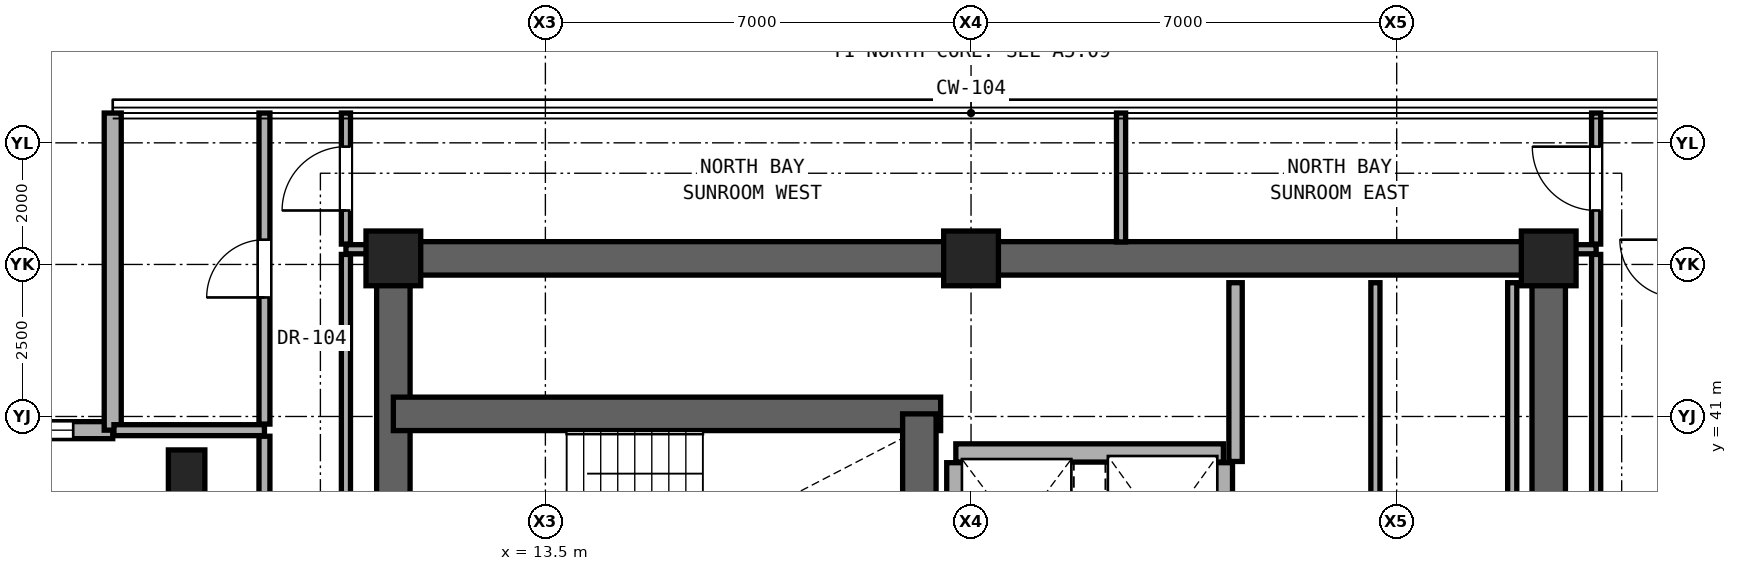
"""IFC4 building model, lengths in metres.
Left out: names, types, materials, properties, quantities, classifications, styles, units other than length and angle.
Written with IfcOpenShell. Run it as: python <this file> out.ifc"""

import sys

from ifc_helpers import new_model, si_unit, direction, frame, frame_2d, origin, origin_2d, place, context, subcontext, project, spatial, rectangle, extrude, element, fill, save


model = new_model("IFC4")
c1 = context("Model", 3, precision=1e-05, world=origin(), true_north=direction((0.0, 1.0)))
c2 = subcontext(c1, "Body", "Model", "MODEL_VIEW")
j1 = project(units=[si_unit("LENGTHUNIT", "METRE"), si_unit("PLANEANGLEUNIT", "RADIAN")], contexts=[c1])
p1 = place(None, origin())
s1 = spatial("IfcSite", under=j1, at=p1, CompositionType="ELEMENT")
p2 = place(p1, origin())
s2 = spatial("IfcBuilding", under=s1, at=p2, CompositionType="ELEMENT")
p3 = place(p2, frame((0.0, 0.0, 183.65)))
s3 = spatial("IfcBuildingStorey", under=s2, at=p3, CompositionType="ELEMENT", Elevation=183.65)
for number, where, z_axis, x_axis in (
    (1, (11.0, 43.6, 0.0), (0.0, 0.0, 1.0), (1.0, 0.0, 0.0)),
    (2, (20.5, 43.6, 0.0), (0.0, 0.0, 1.0), (1.0, 0.0, 0.0)),
    (3, (30.0, 43.6, 0.0), (0.0, 0.0, 1.0), (1.0, 0.0, 0.0)),
):
    element("IfcColumn", number, at=place(p3, frame(where, z_axis=z_axis, x_axis=x_axis)), inside=s3, PredefinedType="COLUMN", context=c2, shape_type="SweptSolid", body=[
        extrude(rectangle(XDim=0.9, YDim=0.9, at=origin_2d()), origin(), (0.0, 0.0, 1.0), 3.25),
    ])
p4 = place(p3, frame((7.6, 40.0, 0.0), z_axis=(0.0, 0.0, 1.0), x_axis=(1.0, 0.0, 0.0)))
e4 = element("IfcColumn", 4, at=p4, inside=s3, PredefinedType="PILASTER", context=c2, shape_type="SweptSolid", body=[
    extrude(rectangle(XDim=0.6, YDim=0.9, at=origin_2d()), origin(), (0.0, 0.0, 1.0), 3.25),
])
p5 = place(p3, frame((11.0, 43.6, 0.0), z_axis=(0.0, 0.0, 1.0), x_axis=(1.0, 0.0, 0.0)))
e5 = element("IfcWall", 5, at=p5, inside=s3, PredefinedType="SHEAR", context=c2, shape_type="SweptSolid", body=[
    extrude(rectangle(XDim=19.0, YDim=0.55, at=frame_2d((9.5, 0.0))), origin(), (0.0, 0.0, 1.0), 3.05),
])
for number, where, z_axis, x_axis in (
    (6, (11.0, 37.6, 0.0), (0.0, 0.0, 1.0), (0.0, 1.0, 0.0)),
    (7, (30.0, 37.6, 0.0), (0.0, 0.0, 1.0), (0.0, 1.0, 0.0)),
):
    element("IfcWall", number, at=place(p3, frame(where, z_axis=z_axis, x_axis=x_axis)), inside=s3, PredefinedType="SHEAR", context=c2, shape_type="SweptSolid", body=[
        extrude(rectangle(XDim=6.0, YDim=0.55, at=frame_2d((3.0, 0.0))), origin(), (0.0, 0.0, 1.0), 3.05),
    ])
p6 = place(p3, frame((11.0, 41.043, 0.0), z_axis=(0.0, 0.0, 1.0), x_axis=(1.0, 0.0, 0.0)))
e8 = element("IfcWall", 8, at=p6, inside=s3, PredefinedType="SHEAR", context=c2, shape_type="SweptSolid", body=[
    extrude(rectangle(XDim=9.0, YDim=0.55, at=frame_2d((4.5, 0.0))), origin(), (0.0, 0.0, 1.0), 3.05),
])
p7 = place(p3, frame((19.65, 37.6, 0.0), z_axis=(0.0, 0.0, 1.0), x_axis=(0.0, 1.0, 0.0)))
e9 = element("IfcWall", 9, at=p7, inside=s3, PredefinedType="SHEAR", context=c2, shape_type="SweptSolid", body=[
    extrude(rectangle(XDim=3.443, YDim=0.55, at=frame_2d((1.721, 0.0))), origin(), (0.0, 0.0, 1.0), 3.05),
])
p8 = place(p3, frame((6.385, 40.775, 0.0), z_axis=(0.0, 0.0, 1.0), x_axis=(-1.0, 0.0, 0.0)))
e10 = element("IfcWall", 10, at=p8, inside=s3, PredefinedType="SOLIDWALL", context=c2, shape_type="SweptSolid", body=[
    extrude(rectangle(XDim=5.215, YDim=0.28, at=frame_2d((2.607, 0.0))), origin(), (0.0, 0.0, 1.0), 3.03),
])
p9 = place(p8, frame((0.65, 0.0, 0.85)))
e11 = element("IfcOpeningElement", 11, at=p9, cuts=e10, PredefinedType="OPENING", context=c2, shape_type="SweptSolid", body=[
    extrude(rectangle(XDim=1.1, YDim=2.0, at=frame_2d((0.55, 1.0))), frame((0.0, 0.15, 0.0), z_axis=(0.0, -1.0, 0.0), x_axis=(1.0, 0.0, 0.0)), (0.0, 0.0, 1.0), 0.3),
])
p10 = place(p3, frame((6.385, 45.99, 0.0), z_axis=(0.0, 0.0, 1.0), x_axis=(0.0, -1.0, 0.0)))
e12 = element("IfcWall", 12, at=p10, inside=s3, PredefinedType="SOLIDWALL", context=c2, shape_type="SweptSolid", body=[
    extrude(rectangle(XDim=5.215, YDim=0.28, at=frame_2d((2.607, 0.0))), origin(), (0.0, 0.0, 1.0), 3.03),
])
p11 = place(p3, frame((20.25, 40.4, 0.0), z_axis=(0.0, 0.0, 1.0), x_axis=(1.0, 0.0, 0.0)))
e13 = element("IfcWall", 13, at=p11, inside=s3, PredefinedType="SOLIDWALL", context=c2, shape_type="SweptSolid", body=[
    extrude(rectangle(XDim=4.4, YDim=0.3, at=frame_2d((2.2, 0.0))), origin(), (0.0, 0.0, 1.0), 3.05),
])
p12 = place(p3, frame((6.405, 40.775, 0.0), z_axis=(0.0, 0.0, 1.0), x_axis=(1.0, 0.0, 0.0)))
e14 = element("IfcWall", 14, at=p12, inside=s3, PredefinedType="PARTITIONING", context=c2, shape_type="SweptSolid", body=[
    extrude(rectangle(XDim=2.475, YDim=0.18, at=frame_2d((1.237, 0.0))), origin(), (0.0, 0.0, 1.0), 3.05),
])
for number, where, z_axis, x_axis in (
    (15, (10.22, 43.75, 0.0), (0.0, 0.0, 1.0), (1.0, 0.0, 0.0)),
    (16, (30.27, 43.75, 0.0), (0.0, 0.0, 1.0), (1.0, 0.0, 0.0)),
):
    element("IfcWall", number, at=place(p3, frame(where, z_axis=z_axis, x_axis=x_axis)), inside=s3, PredefinedType="PARTITIONING", context=c2, shape_type="SweptSolid", body=[
        extrude(rectangle(XDim=0.51, YDim=0.15, at=frame_2d((0.255, 0.0))), origin(), (0.0, 0.0, 1.0), 3.05),
    ])
p13 = place(p3, frame((8.88, 32.718, 0.0), z_axis=(0.0, 0.0, 1.0), x_axis=(0.0, 1.0, 0.0)))
e17 = element("IfcWall", 17, at=p13, inside=s3, PredefinedType="PARTITIONING", context=c2, shape_type="SweptSolid", body=[
    extrude(rectangle(XDim=7.957, YDim=0.18, at=frame_2d((3.979, 0.0))), origin(), (0.0, 0.0, 1.0), 2.442),
])
p14 = place(p13, frame((3.454, 0.0, 0.0)))
e18 = element("IfcOpeningElement", 18, at=p14, cuts=e17, PredefinedType="OPENING", context=c2, shape_type="SweptSolid", body=[
    extrude(rectangle(XDim=1.05, YDim=2.2, at=frame_2d((0.525, 1.1))), frame((0.0, 0.1, 0.0), z_axis=(0.0, -1.0, 0.0), x_axis=(1.0, 0.0, 0.0)), (0.0, 0.0, 1.0), 0.2),
])
p15 = place(p3, frame((8.88, 40.875, 0.0), z_axis=(0.0, 0.0, 1.0), x_axis=(0.0, 1.0, 0.0)))
e19 = element("IfcWall", 19, at=p15, inside=s3, PredefinedType="PARTITIONING", context=c2, shape_type="SweptSolid", body=[
    extrude(rectangle(XDim=5.115, YDim=0.18, at=frame_2d((2.558, 0.0))), origin(), (0.0, 0.0, 1.0), 3.05),
])
p16 = place(p15, frame((2.083, 0.0, 0.0)))
e20 = element("IfcOpeningElement", 20, at=p16, cuts=e19, PredefinedType="OPENING", context=c2, shape_type="SweptSolid", body=[
    extrude(rectangle(XDim=0.95, YDim=2.15, at=frame_2d((0.475, 1.075))), frame((0.0, 0.1, 0.0), z_axis=(0.0, -1.0, 0.0), x_axis=(1.0, 0.0, 0.0)), (0.0, 0.0, 1.0), 0.2),
])
p17 = place(p3, frame((10.22, 34.535, 0.0), z_axis=(0.0, 0.0, 1.0), x_axis=(0.0, 1.0, 0.0)))
e21 = element("IfcWall", 21, at=p17, inside=s3, PredefinedType="PARTITIONING", context=c2, shape_type="SweptSolid", body=[
    extrude(rectangle(XDim=9.13, YDim=0.15, at=frame_2d((4.565, 0.0))), origin(), (0.0, 0.0, 1.0), 2.442),
])
p18 = place(p3, frame((10.22, 43.835, 0.0), z_axis=(0.0, 0.0, 1.0), x_axis=(0.0, 1.0, 0.0)))
e22 = element("IfcWall", 22, at=p18, inside=s3, PredefinedType="PARTITIONING", context=c2, shape_type="SweptSolid", body=[
    extrude(rectangle(XDim=2.155, YDim=0.15, at=frame_2d((1.078, 0.0))), origin(), (0.0, 0.0, 1.0), 3.05),
])
p19 = place(p18, frame((0.552, 0.0, 0.0)))
e23 = element("IfcOpeningElement", 23, at=p19, cuts=e22, PredefinedType="OPENING", context=c2, shape_type="SweptSolid", body=[
    extrude(rectangle(XDim=1.05, YDim=2.2, at=frame_2d((0.525, 1.1))), frame((0.0, 0.085, 0.0), z_axis=(0.0, -1.0, 0.0), x_axis=(1.0, 0.0, 0.0)), (0.0, 0.0, 1.0), 0.17),
])
p20 = place(p3, frame((20.25, 37.87, 0.0), z_axis=(0.0, 0.0, 1.0), x_axis=(0.0, 1.0, 0.0)))
e24 = element("IfcWall", 24, at=p20, inside=s3, PredefinedType="SOLIDWALL", context=c2, shape_type="SweptSolid", body=[
    extrude(rectangle(XDim=2.37, YDim=0.3, at=frame_2d((1.185, 0.0))), origin(), (0.0, 0.0, 1.0), 3.05),
])
p21 = place(p3, frame((22.967, 43.87, 0.0), z_axis=(0.0, 0.0, 1.0), x_axis=(0.0, 1.0, 0.0)))
e25 = element("IfcWall", 25, at=p21, inside=s3, PredefinedType="PARTITIONING", context=c2, shape_type="SweptSolid", body=[
    extrude(rectangle(XDim=2.12, YDim=0.15, at=frame_2d((1.06, 0.0))), origin(), (0.0, 0.0, 1.0), 3.05),
])
p22 = place(p3, frame((24.65, 37.87, 0.0), z_axis=(0.0, 0.0, 1.0), x_axis=(0.0, 1.0, 0.0)))
e26 = element("IfcWall", 26, at=p22, inside=s3, PredefinedType="SOLIDWALL", context=c2, shape_type="SweptSolid", body=[
    extrude(rectangle(XDim=2.37, YDim=0.3, at=frame_2d((1.185, 0.0))), origin(), (0.0, 0.0, 1.0), 3.05),
])
p23 = place(p3, frame((24.85, 40.26, 0.0), z_axis=(0.0, 0.0, 1.0), x_axis=(0.0, 1.0, 0.0)))
e27 = element("IfcWall", 27, at=p23, inside=s3, PredefinedType="SOLIDWALL", context=c2, shape_type="SweptSolid", body=[
    extrude(rectangle(XDim=2.94, YDim=0.22, at=frame_2d((1.47, 0.0))), origin(), (0.0, 0.0, 1.0), 3.05),
])
for number, where, z_axis, x_axis in (
    (28, (27.15, 37.87, 0.0), (0.0, 0.0, 1.0), (0.0, 1.0, 0.0)),
    (29, (29.4, 37.87, 0.0), (0.0, 0.0, 1.0), (0.0, 1.0, 0.0)),
):
    element("IfcWall", number, at=place(p3, frame(where, z_axis=z_axis, x_axis=x_axis)), inside=s3, PredefinedType="PARTITIONING", context=c2, shape_type="SweptSolid", body=[
        extrude(rectangle(XDim=5.33, YDim=0.15, at=frame_2d((2.665, 0.0))), origin(), (0.0, 0.0, 1.0), 3.05),
    ])
p24 = place(p3, frame((30.78, 34.57, 0.0), z_axis=(0.0, 0.0, 1.0), x_axis=(0.0, 1.0, 0.0)))
e30 = element("IfcWall", 30, at=p24, inside=s3, PredefinedType="PARTITIONING", context=c2, shape_type="SweptSolid", body=[
    extrude(rectangle(XDim=9.095, YDim=0.15, at=frame_2d((4.547, 0.0))), origin(), (0.0, 0.0, 1.0), 2.442),
])
p25 = place(p3, frame((30.78, 43.835, 0.0), z_axis=(0.0, 0.0, 1.0), x_axis=(0.0, 1.0, 0.0)))
e31 = element("IfcWall", 31, at=p25, inside=s3, PredefinedType="PARTITIONING", context=c2, shape_type="SweptSolid", body=[
    extrude(rectangle(XDim=2.155, YDim=0.15, at=frame_2d((1.078, 0.0))), origin(), (0.0, 0.0, 1.0), 3.05),
])
p26 = place(p25, frame((0.552, 0.0, 0.0)))
e32 = element("IfcOpeningElement", 32, at=p26, cuts=e31, PredefinedType="OPENING", context=c2, shape_type="SweptSolid", body=[
    extrude(rectangle(XDim=1.05, YDim=2.2, at=frame_2d((0.525, 1.1))), frame((0.0, 0.085, 0.0), z_axis=(0.0, -1.0, 0.0), x_axis=(1.0, 0.0, 0.0)), (0.0, 0.0, 1.0), 0.17),
])
p27 = place(p9, origin())
e33 = element("IfcWindow", 33, at=p27, inside=s3, PartitioningType="SINGLE_PANEL", PredefinedType="WINDOW", context=c2, shape_type="SweptSolid", body=[
    extrude(rectangle(XDim=1.1, YDim=2.0, at=frame_2d((0.55, 1.0))), frame((0.0, 0.03, 0.0), z_axis=(0.0, -1.0, 0.0), x_axis=(1.0, 0.0, 0.0)), (0.0, 0.0, 1.0), 0.06),
])
fill(e11, e33)
p28 = place(p19, origin())
e34 = element("IfcDoor", 34, at=p28, inside=s3, OperationType="SINGLE_SWING_LEFT", PredefinedType="DOOR", context=c2, shape_type="SweptSolid", body=[
    extrude(rectangle(XDim=1.05, YDim=2.2, at=frame_2d((0.525, 1.1))), frame((0.0, 0.025, 0.0), z_axis=(0.0, -1.0, 0.0), x_axis=(1.0, 0.0, 0.0)), (0.0, 0.0, 1.0), 0.05),
])
fill(e23, e34)
p29 = place(p26, origin())
e35 = element("IfcDoor", 35, at=p29, inside=s3, OperationType="SINGLE_SWING_RIGHT", PredefinedType="DOOR", context=c2, shape_type="SweptSolid", body=[
    extrude(rectangle(XDim=1.05, YDim=2.2, at=frame_2d((0.525, 1.1))), frame((0.0, 0.025, 0.0), z_axis=(0.0, -1.0, 0.0), x_axis=(1.0, 0.0, 0.0)), (0.0, 0.0, 1.0), 0.05),
])
fill(e32, e35)
p30 = place(p16, origin())
e36 = element("IfcDoor", 36, at=p30, inside=s3, OperationType="SINGLE_SWING_LEFT", PredefinedType="DOOR", context=c2, shape_type="SweptSolid", body=[
    extrude(rectangle(XDim=0.95, YDim=2.15, at=frame_2d((0.475, 1.075))), frame((0.0, 0.025, 0.0), z_axis=(0.0, -1.0, 0.0), x_axis=(1.0, 0.0, 0.0)), (0.0, 0.0, 1.0), 0.05),
])
fill(e20, e36)
save(model, sys.argv[1])
